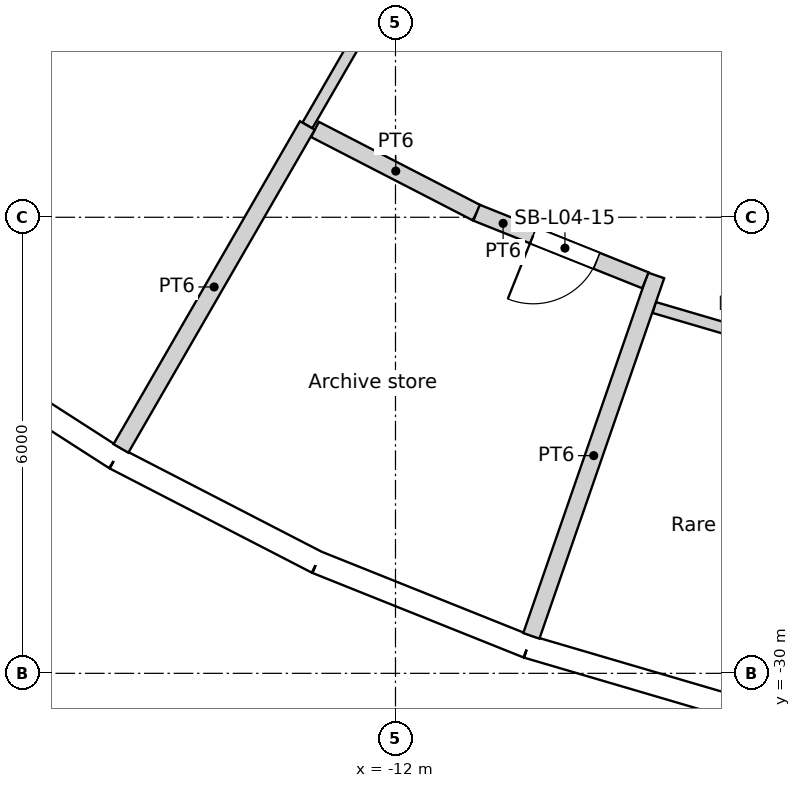
"""IFC4 building model, lengths in metres.
Left out: names, types, materials, properties, quantities, classifications, styles, units other than length and angle.
Written with IfcOpenShell. Run it as: python <this file> out.ifc"""

import sys

from ifc_helpers import new_model, si_unit, direction, frame, frame_2d, origin, origin_2d, place, context, subcontext, project, spatial, rectangle, circle, extrude, element, fill, save


model = new_model("IFC4")
c1 = context("Model", 3, precision=1e-05, world=origin(), true_north=direction((0.0, 1.0)))
c2 = subcontext(c1, "Body", "Model", "MODEL_VIEW")
j1 = project(units=[si_unit("LENGTHUNIT", "METRE"), si_unit("PLANEANGLEUNIT", "RADIAN")], contexts=[c1])
p1 = place(None, origin())
s1 = spatial("IfcSite", under=j1, at=p1, CompositionType="ELEMENT")
p2 = place(p1, origin())
s2 = spatial("IfcBuilding", under=s1, at=p2, CompositionType="ELEMENT")
p3 = place(p2, frame((0.0, 0.0, 23.4)))
s3 = spatial("IfcBuildingStorey", under=s2, at=p3, CompositionType="ELEMENT", Elevation=23.4)
for number, where, z_axis, x_axis in (
    (1, (-15.137, -26.219, 0.0), (0.0, 0.0, 1.0), (1.0, 0.0, 0.0)),
    (2, (-9.902, -28.61, 0.0), (0.0, 0.0, 1.0), (1.0, 0.0, 0.0)),
):
    element("IfcColumn", number, at=place(p3, frame(where, z_axis=z_axis, x_axis=x_axis)), inside=s3, PredefinedType="COLUMN", context=c2, shape_type="SweptSolid", body=[
        extrude(circle(Radius=0.7, at=origin_2d()), origin(), (0.0, 0.0, 1.0), 4.8),
    ])
for number, where, z_axis, x_axis in (
    (3, (-12.274, -21.259, 0.0), (0.0, 0.0, 1.0), (1.0, 0.0, 0.0)),
    (4, (-7.04, -23.516, 0.0), (0.0, 0.0, 1.0), (1.0, 0.0, 0.0)),
):
    element("IfcColumn", number, at=place(p3, frame(where, z_axis=z_axis, x_axis=x_axis)), inside=s3, PredefinedType="COLUMN", context=c2, shape_type="SweptSolid", body=[
        extrude(circle(Radius=0.75, at=origin_2d()), origin(), (0.0, 0.0, 1.0), 4.8),
    ])
p4 = place(p3, frame((-18.199, -25.557, 0.0), z_axis=(0.0, 0.0, 1.0), x_axis=(0.841242231846, -0.540658401727, 0.0)))
e5 = element("IfcWall", 5, at=p4, inside=s3, PredefinedType="SOLIDWALL", context=c2, shape_type="SweptSolid", body=[
    extrude(rectangle(XDim=2.986, YDim=0.3, at=frame_2d((1.493, 0.0))), origin(), (0.0, 0.0, 1.0), 4.35),
])
p5 = place(p4, frame((1.493, 0.0, 2.0)))
e6 = element("IfcOpeningElement", 6, at=p5, cuts=e5, PredefinedType="OPENING", context=c2, shape_type="SweptSolid", body=[
    extrude(circle(Radius=1.2, at=origin_2d()), frame((0.0, 0.16, 0.0), z_axis=(0.0, -1.0, 0.0), x_axis=(1.0, 0.0, 0.0)), (0.0, 0.0, 1.0), 0.32),
])
p6 = place(p3, frame((-15.687, -27.171, 0.0), z_axis=(0.0, 0.0, 1.0), x_axis=(0.888831268481, -0.458234630043, 0.0)))
e7 = element("IfcWall", 7, at=p6, inside=s3, PredefinedType="SOLIDWALL", context=c2, shape_type="SweptSolid", body=[
    extrude(rectangle(XDim=2.986, YDim=0.3, at=frame_2d((1.493, 0.0))), origin(), (0.0, 0.0, 1.0), 4.35),
])
p7 = place(p6, frame((1.493, 0.0, 2.0)))
e8 = element("IfcOpeningElement", 8, at=p7, cuts=e7, PredefinedType="OPENING", context=c2, shape_type="SweptSolid", body=[
    extrude(circle(Radius=1.2, at=origin_2d()), frame((0.0, 0.16, 0.0), z_axis=(0.0, -1.0, 0.0), x_axis=(1.0, 0.0, 0.0)), (0.0, 0.0, 1.0), 0.32),
])
p8 = place(p3, frame((-13.033, -28.539, 0.0), z_axis=(0.0, 0.0, 1.0), x_axis=(0.928380795373, -0.371630325434, 0.0)))
e9 = element("IfcWall", 9, at=p8, inside=s3, PredefinedType="SOLIDWALL", context=c2, shape_type="SweptSolid", body=[
    extrude(rectangle(XDim=2.986, YDim=0.3, at=frame_2d((1.493, 0.0))), origin(), (0.0, 0.0, 1.0), 3.85),
])
p9 = place(p8, frame((1.493, 0.0, 2.0)))
e10 = element("IfcOpeningElement", 10, at=p9, cuts=e9, PredefinedType="OPENING", context=c2, shape_type="SweptSolid", body=[
    extrude(circle(Radius=1.2, at=origin_2d()), frame((0.0, 0.16, 0.0), z_axis=(0.0, -1.0, 0.0), x_axis=(1.0, 0.0, 0.0)), (0.0, 0.0, 1.0), 0.32),
])
p10 = place(p3, frame((-10.261, -29.649, 0.0), z_axis=(0.0, 0.0, 1.0), x_axis=(0.959502108153, -0.281701445593, 0.0)))
e11 = element("IfcWall", 11, at=p10, inside=s3, PredefinedType="SOLIDWALL", context=c2, shape_type="SweptSolid", body=[
    extrude(rectangle(XDim=2.986, YDim=0.3, at=frame_2d((1.493, 0.0))), origin(), (0.0, 0.0, 1.0), 4.35),
])
p11 = place(p10, frame((1.493, 0.0, 2.0)))
e12 = element("IfcOpeningElement", 12, at=p11, cuts=e11, PredefinedType="OPENING", context=c2, shape_type="SweptSolid", body=[
    extrude(circle(Radius=1.2, at=origin_2d()), frame((0.0, 0.16, 0.0), z_axis=(0.0, -1.0, 0.0), x_axis=(1.0, 0.0, 0.0)), (0.0, 0.0, 1.0), 0.32),
])
p12 = place(p3, frame((-15.612, -27.041, 0.0), z_axis=(0.0, 0.0, 1.0), x_axis=(0.499982380289, 0.86603557629, 0.0)))
e13 = element("IfcWall", 13, at=p12, inside=s3, PredefinedType="PARTITIONING", context=c2, shape_type="SweptSolid", body=[
    extrude(rectangle(XDim=4.906, YDim=0.225, at=frame_2d((2.453, 0.0))), origin(), (0.0, 0.0, 1.0), 3.75),
])
p13 = place(p3, frame((-13.059, -22.844, 0.0), z_axis=(0.0, 0.0, 1.0), x_axis=(0.888868766166, -0.458161889002, 0.0)))
e14 = element("IfcWall", 14, at=p13, inside=s3, PredefinedType="PARTITIONING", context=c2, shape_type="SweptSolid", body=[
    extrude(rectangle(XDim=2.392, YDim=0.225, at=frame_2d((1.196, 0.0))), origin(), (0.0, 0.0, 1.0), 3.75),
])
p14 = place(p3, frame((-13.159, -22.793, 0.0), z_axis=(0.0, 0.0, 1.0), x_axis=(0.500009225661, 0.866020077281, 0.0)))
e15 = element("IfcWall", 15, at=p14, inside=s3, PredefinedType="PARTITIONING", context=c2, shape_type="SweptSolid", body=[
    extrude(rectangle(XDim=11.914, YDim=0.15, at=frame_2d((5.957, 0.0))), origin(), (0.0, 0.0, 1.0), 3.75),
])
p15 = place(p3, frame((-8.712, -24.829, 0.0), z_axis=(0.0, 0.0, 1.0), x_axis=(-0.928349940024, 0.37170739683, 0.0)))
e16 = element("IfcWall", 16, at=p15, inside=s3, PredefinedType="PARTITIONING", context=c2, shape_type="SweptSolid", body=[
    extrude(rectangle(XDim=2.392, YDim=0.225, at=frame_2d((1.196, 0.0))), origin(), (0.0, 0.0, 1.0), 3.75),
])
p16 = place(p15, frame((0.69, 0.0, 0.0)))
e17 = element("IfcOpeningElement", 17, at=p16, cuts=e16, PredefinedType="OPENING", context=c2, shape_type="SweptSolid", body=[
    extrude(rectangle(XDim=0.9, YDim=2.1, at=frame_2d((0.45, 1.05))), frame((0.0, 0.113, 0.0), z_axis=(0.0, -1.0, 0.0), x_axis=(1.0, 0.0, 0.0)), (0.0, 0.0, 1.0), 0.225),
])
p17 = place(p3, frame((-10.212, -29.507, 0.0), z_axis=(0.0, 0.0, 1.0), x_axis=(0.327037038986, 0.945011521163, 0.0)))
e18 = element("IfcWall", 18, at=p17, inside=s3, PredefinedType="PARTITIONING", context=c2, shape_type="SweptSolid", body=[
    extrude(rectangle(XDim=5.018, YDim=0.225, at=frame_2d((2.509, 0.0))), origin(), (0.0, 0.0, 1.0), 3.75),
])
p18 = place(p3, frame((-8.596, -25.187, 0.0), z_axis=(0.0, 0.0, 1.0), x_axis=(0.959498797191, -0.281712722802, 0.0)))
e19 = element("IfcWall", 19, at=p18, inside=s3, PredefinedType="PARTITIONING", context=c2, shape_type="SweptSolid", body=[
    extrude(rectangle(XDim=2.419, YDim=0.15, at=frame_2d((1.209, 0.0))), origin(), (0.0, 0.0, 1.0), 3.75),
])
p19 = place(p5, origin())
e20 = element("IfcWindow", 20, at=p19, inside=s3, PartitioningType="SINGLE_PANEL", PredefinedType="WINDOW", context=c2, shape_type="SweptSolid", body=[
    extrude(circle(Radius=1.2, at=origin_2d()), frame((0.0, 0.12, 0.0), z_axis=(0.0, -1.0, 0.0), x_axis=(1.0, 0.0, 0.0)), (0.0, 0.0, 1.0), 0.1),
])
fill(e6, e20)
p20 = place(p7, origin())
e21 = element("IfcWindow", 21, at=p20, inside=s3, PartitioningType="SINGLE_PANEL", PredefinedType="WINDOW", context=c2, shape_type="SweptSolid", body=[
    extrude(circle(Radius=1.2, at=origin_2d()), frame((0.0, 0.12, 0.0), z_axis=(0.0, -1.0, 0.0), x_axis=(1.0, 0.0, 0.0)), (0.0, 0.0, 1.0), 0.1),
])
fill(e8, e21)
p21 = place(p9, origin())
e22 = element("IfcWindow", 22, at=p21, inside=s3, PartitioningType="SINGLE_PANEL", PredefinedType="WINDOW", context=c2, shape_type="SweptSolid", body=[
    extrude(circle(Radius=1.2, at=origin_2d()), frame((0.0, 0.12, 0.0), z_axis=(0.0, -1.0, 0.0), x_axis=(1.0, 0.0, 0.0)), (0.0, 0.0, 1.0), 0.1),
])
fill(e10, e22)
p22 = place(p11, origin())
e23 = element("IfcWindow", 23, at=p22, inside=s3, PartitioningType="SINGLE_PANEL", PredefinedType="WINDOW", context=c2, shape_type="SweptSolid", body=[
    extrude(circle(Radius=1.2, at=origin_2d()), frame((0.0, 0.12, 0.0), z_axis=(0.0, -1.0, 0.0), x_axis=(1.0, 0.0, 0.0)), (0.0, 0.0, 1.0), 0.1),
])
fill(e12, e23)
p23 = place(p16, origin())
e24 = element("IfcDoor", 24, at=p23, inside=s3, OperationType="SINGLE_SWING_RIGHT", PredefinedType="DOOR", context=c2, shape_type="SweptSolid", body=[
    extrude(rectangle(XDim=0.9, YDim=2.1, at=frame_2d((0.45, 1.05))), frame((0.0, 0.025, 0.0), z_axis=(0.0, -1.0, 0.0), x_axis=(1.0, 0.0, 0.0)), (0.0, 0.0, 1.0), 0.05),
])
fill(e17, e24)
save(model, sys.argv[1])
